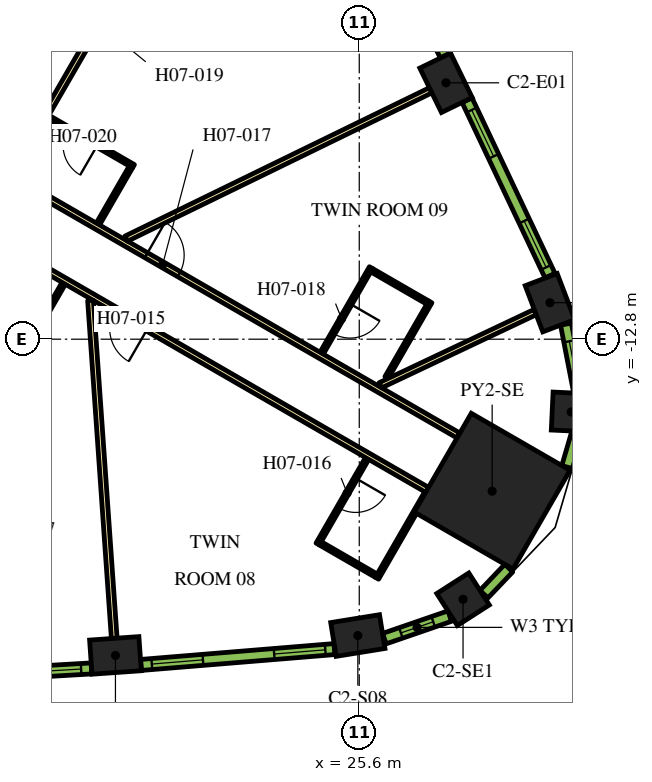
"""IFC4 building model, lengths in metres.
Left out: names, types, materials, properties, quantities, classifications, styles, units other than length and angle.
Written with IfcOpenShell. Run it as: python <this file> out.ifc"""

import sys

from ifc_helpers import new_model, si_unit, direction, frame, frame_2d, origin, origin_2d, place, context, subcontext, project, spatial, rectangle, extrude, element, fill, save


model = new_model("IFC4")
c1 = context("Model", 3, precision=1e-05, world=origin(), true_north=direction((0.0, 1.0)))
c2 = subcontext(c1, "Body", "Model", "MODEL_VIEW")
j1 = project(units=[si_unit("LENGTHUNIT", "METRE"), si_unit("PLANEANGLEUNIT", "RADIAN")], contexts=[c1])
p1 = place(None, origin())
s1 = spatial("IfcSite", under=j1, at=p1, CompositionType="ELEMENT")
p2 = place(p1, origin())
s2 = spatial("IfcBuilding", under=s1, at=p2, CompositionType="ELEMENT")
p3 = place(p2, frame((0.0, 0.0, 103.2)))
s3 = spatial("IfcBuildingStorey", under=s2, at=p3, CompositionType="ELEMENT", Elevation=103.2)
p4 = place(p3, frame((29.097, -16.799, 0.0), z_axis=(0.0, 0.0, 1.0), x_axis=(0.866025403784, -0.5, 0.0)))
e1 = element("IfcColumn", 1, at=p4, inside=s3, PredefinedType="COLUMN", context=c2, shape_type="SweptSolid", body=[
    extrude(rectangle(XDim=3.0, YDim=3.0, at=origin_2d()), origin(), (0.0, 0.0, 1.0), 3.9),
])
for number, where, z_axis, x_axis in (
    (2, (19.184, -21.12, 0.0), (0.0, 0.0, 1.0), (0.998, 0.07, 0.0)),
    (3, (25.563, -20.597, 0.0), (0.0, 0.0, 1.0), (0.987, 0.159, 0.0)),
):
    element("IfcColumn", number, at=place(p3, frame(where, z_axis=z_axis, x_axis=x_axis)), inside=s3, PredefinedType="COLUMN", context=c2, shape_type="SweptSolid", body=[
        extrude(rectangle(XDim=1.3, YDim=0.9, at=origin_2d()), origin(), (0.0, 0.0, 1.0), 3.9),
    ])
for number, where, z_axis, x_axis in (
    (4, (28.331, -19.643, 0.0), (0.0, 0.0, 1.0), (0.842, 0.54, 0.0)),
    (5, (31.177, -14.714, 0.0), (0.0, 0.0, 1.0), (0.047, 0.999, 0.0)),
):
    element("IfcColumn", number, at=place(p3, frame(where, z_axis=z_axis, x_axis=x_axis)), inside=s3, PredefinedType="COLUMN", context=c2, shape_type="SweptSolid", body=[
        extrude(rectangle(XDim=1.0, YDim=1.0, at=origin_2d()), origin(), (0.0, 0.0, 1.0), 3.9),
    ])
for number, where, z_axis, x_axis in (
    (6, (30.619, -11.839, 0.0), (0.0, 0.0, 1.0), (-0.355, 0.935, 0.0)),
    (7, (27.883, -6.054, 0.0), (0.0, 0.0, 1.0), (-0.438, 0.899, 0.0)),
):
    element("IfcColumn", number, at=place(p3, frame(where, z_axis=z_axis, x_axis=x_axis)), inside=s3, PredefinedType="COLUMN", context=c2, shape_type="SweptSolid", body=[
        extrude(rectangle(XDim=1.3, YDim=0.9, at=origin_2d()), origin(), (0.0, 0.0, 1.0), 3.9),
    ])
p5 = place(p3, frame((16.412, -8.523, 0.0), z_axis=(0.0, 0.0, 1.0), x_axis=(0.866025629663, -0.499999608766, 0.0)))
e8 = element("IfcWall", 8, at=p5, inside=s3, PredefinedType="PARTITIONING", context=c2, shape_type="SweptSolid", body=[
    extrude(rectangle(XDim=13.624, YDim=0.15, at=frame_2d((6.812, 0.0))), origin(), (0.0, 0.0, 1.0), 2.75),
])
p6 = place(p5, frame((4.134, 0.0, 0.0)))
e9 = element("IfcOpeningElement", 9, at=p6, cuts=e8, PredefinedType="OPENING", context=c2, shape_type="SweptSolid", body=[
    extrude(rectangle(XDim=1.0, YDim=2.1, at=frame_2d((0.5, 1.05))), frame((0.0, 0.085, 0.0), z_axis=(0.0, -1.0, 0.0), x_axis=(1.0, 0.0, 0.0)), (0.0, 0.0, 1.0), 0.17),
])
p7 = place(p3, frame((19.081, -3.9, 0.0), z_axis=(0.0, 0.0, 1.0), x_axis=(-0.499974327079, -0.866040225545, 0.0)))
e10 = element("IfcWall", 10, at=p7, inside=s3, PredefinedType="PARTITIONING", context=c2, shape_type="SweptSolid", body=[
    extrude(rectangle(XDim=5.258, YDim=0.15, at=frame_2d((2.629, 0.0))), origin(), (0.0, 0.0, 1.0), 2.75),
])
p8 = place(p7, frame((0.18, 0.0, 0.0)))
e11 = element("IfcOpeningElement", 11, at=p8, cuts=e10, PredefinedType="OPENING", context=c2, shape_type="SweptSolid", body=[
    extrude(rectangle(XDim=1.0, YDim=2.1, at=frame_2d((0.5, 1.05))), frame((0.0, 0.085, 0.0), z_axis=(0.0, -1.0, 0.0), x_axis=(1.0, 0.0, 0.0)), (0.0, 0.0, 1.0), 0.17),
])
p9 = place(p3, frame((27.386, -16.764, 0.0), z_axis=(0.0, 0.0, 1.0), x_axis=(-0.866022585856, 0.500004880763, 0.0)))
e12 = element("IfcWall", 12, at=p9, inside=s3, PredefinedType="PARTITIONING", context=c2, shape_type="SweptSolid", body=[
    extrude(rectangle(XDim=13.544, YDim=0.15, at=frame_2d((6.772, 0.0))), origin(), (0.0, 0.0, 1.0), 2.75),
])
p10 = place(p9, frame((8.491, 0.0, 0.0)))
e13 = element("IfcOpeningElement", 13, at=p10, cuts=e12, PredefinedType="OPENING", context=c2, shape_type="SweptSolid", body=[
    extrude(rectangle(XDim=1.0, YDim=2.1, at=frame_2d((0.5, 1.05))), frame((0.0, 0.085, 0.0), z_axis=(0.0, -1.0, 0.0), x_axis=(1.0, 0.0, 0.0)), (0.0, 0.0, 1.0), 0.17),
])
p11 = place(p3, frame((19.153, -20.671, 0.0), z_axis=(0.0, 0.0, 1.0), x_axis=(-0.070070736723, 0.997542025107, 0.0)))
e14 = element("IfcWall", 14, at=p11, inside=s3, PredefinedType="PARTITIONING", context=c2, shape_type="SweptSolid", body=[
    extrude(rectangle(XDim=8.909, YDim=0.15, at=frame_2d((4.455, 0.0))), origin(), (0.0, 0.0, 1.0), 2.75),
])
p12 = place(p3, frame((27.479, -6.251, 0.0), z_axis=(0.0, 0.0, 1.0), x_axis=(-0.898945877276, -0.438059710231, 0.0)))
e15 = element("IfcWall", 15, at=p12, inside=s3, PredefinedType="PARTITIONING", context=c2, shape_type="SweptSolid", body=[
    extrude(rectangle(XDim=8.909, YDim=0.15, at=frame_2d((4.455, 0.0))), origin(), (0.0, 0.0, 1.0), 2.75),
])
p13 = place(p3, frame((30.231, -12.085, 0.0), z_axis=(0.0, 0.0, 1.0), x_axis=(-0.904001132572, -0.427530060122, 0.0)))
e16 = element("IfcWall", 16, at=p13, inside=s3, PredefinedType="PARTITIONING", context=c2, shape_type="SweptSolid", body=[
    extrude(rectangle(XDim=4.51, YDim=0.15, at=frame_2d((2.255, 0.0))), origin(), (0.0, 0.0, 1.0), 2.75),
])
p14 = place(p3, frame((16.978, -12.793, 0.0), z_axis=(0.0, 0.0, 1.0), x_axis=(0.500147619332, 0.865940158947, 0.0)))
e17 = element("IfcWall", 17, at=p14, inside=s3, PredefinedType="PARTITIONING", context=c2, shape_type="SweptSolid", body=[
    extrude(rectangle(XDim=1.69, YDim=0.1, at=frame_2d((0.845, 0.0))), origin(), (0.0, 0.0, 1.0), 2.75),
])
p15 = place(p3, frame((25.807, -15.939, 0.0), z_axis=(0.0, 0.0, 1.0), x_axis=(-0.500006934395, -0.866021400173, 0.0)))
e18 = element("IfcWall", 18, at=p15, inside=s3, PredefinedType="PARTITIONING", context=c2, shape_type="SweptSolid", body=[
    extrude(rectangle(XDim=2.6, YDim=0.1, at=frame_2d((1.3, 0.0))), origin(), (0.0, 0.0, 1.0), 2.75),
])
p16 = place(p15, frame((0.6, 0.0, 0.0)))
e19 = element("IfcOpeningElement", 19, at=p16, cuts=e18, PredefinedType="OPENING", context=c2, shape_type="SweptSolid", body=[
    extrude(rectangle(XDim=0.9, YDim=2.1, at=frame_2d((0.45, 1.05))), frame((0.0, 0.06, 0.0), z_axis=(0.0, -1.0, 0.0), x_axis=(1.0, 0.0, 0.0)), (0.0, 0.0, 1.0), 0.12),
])
p17 = place(p3, frame((24.575, -18.172, 0.0), z_axis=(0.0, 0.0, 1.0), x_axis=(0.865989465428, -0.500062241894, 0.0)))
e20 = element("IfcWall", 20, at=p17, inside=s3, PredefinedType="PARTITIONING", context=c2, shape_type="SweptSolid", body=[
    extrude(rectangle(XDim=1.7, YDim=0.1, at=frame_2d((0.85, 0.0))), origin(), (0.0, 0.0, 1.0), 2.75),
])
p18 = place(p3, frame((27.365, -16.839, 0.0), z_axis=(0.0, 0.0, 1.0), x_axis=(-0.500006934395, -0.866021400173, 0.0)))
e21 = element("IfcWall", 21, at=p18, inside=s3, PredefinedType="PARTITIONING", context=c2, shape_type="SweptSolid", body=[
    extrude(rectangle(XDim=2.6, YDim=0.1, at=frame_2d((1.3, 0.0))), origin(), (0.0, 0.0, 1.0), 2.75),
])
p19 = place(p3, frame((25.91, -10.918, 0.0), z_axis=(0.0, 0.0, 1.0), x_axis=(-0.500006934395, -0.866021400173, 0.0)))
e22 = element("IfcWall", 22, at=p19, inside=s3, PredefinedType="PARTITIONING", context=c2, shape_type="SweptSolid", body=[
    extrude(rectangle(XDim=2.6, YDim=0.1, at=frame_2d((1.3, 0.0))), origin(), (0.0, 0.0, 1.0), 2.75),
])
p20 = place(p19, frame((1.1, 0.0, 0.0)))
e23 = element("IfcOpeningElement", 23, at=p20, cuts=e22, PredefinedType="OPENING", context=c2, shape_type="SweptSolid", body=[
    extrude(rectangle(XDim=0.9, YDim=2.1, at=frame_2d((0.45, 1.05))), frame((0.0, 0.06, 0.0), z_axis=(0.0, -1.0, 0.0), x_axis=(1.0, 0.0, 0.0)), (0.0, 0.0, 1.0), 0.12),
])
p21 = place(p3, frame((25.928, -10.986, 0.0), z_axis=(0.0, 0.0, 1.0), x_axis=(0.866025371046, -0.500000056704, 0.0)))
e24 = element("IfcWall", 24, at=p21, inside=s3, PredefinedType="PARTITIONING", context=c2, shape_type="SweptSolid", body=[
    extrude(rectangle(XDim=1.7, YDim=0.1, at=frame_2d((0.85, 0.0))), origin(), (0.0, 0.0, 1.0), 2.75),
])
p22 = place(p3, frame((26.319, -13.81, 0.0), z_axis=(0.0, 0.0, 1.0), x_axis=(0.499952165731, 0.866053019151, 0.0)))
e25 = element("IfcWall", 25, at=p22, inside=s3, PredefinedType="PARTITIONING", context=c2, shape_type="SweptSolid", body=[
    extrude(rectangle(XDim=2.3, YDim=0.1, at=frame_2d((1.15, 0.0))), origin(), (0.0, 0.0, 1.0), 2.75),
])
p23 = place(p3, frame((19.659, -8.25, 0.0), z_axis=(0.0, 0.0, 1.0), x_axis=(-0.866021400173, 0.500006934395, 0.0)))
e26 = element("IfcWall", 26, at=p23, inside=s3, PredefinedType="PARTITIONING", context=c2, shape_type="SweptSolid", body=[
    extrude(rectangle(XDim=2.6, YDim=0.1, at=frame_2d((1.3, 0.0))), origin(), (0.0, 0.0, 1.0), 2.75),
])
p24 = place(p23, frame((1.1, 0.0, 0.0)))
e27 = element("IfcOpeningElement", 27, at=p24, cuts=e26, PredefinedType="OPENING", context=c2, shape_type="SweptSolid", body=[
    extrude(rectangle(XDim=0.9, YDim=2.1, at=frame_2d((0.45, 1.05))), frame((0.0, 0.06, 0.0), z_axis=(0.0, -1.0, 0.0), x_axis=(1.0, 0.0, 0.0)), (0.0, 0.0, 1.0), 0.12),
])
p25 = place(p3, frame((19.591, -8.268, 0.0), z_axis=(0.0, 0.0, 1.0), x_axis=(-0.500040090343, -0.866002256377, 0.0)))
e28 = element("IfcWall", 28, at=p25, inside=s3, PredefinedType="PARTITIONING", context=c2, shape_type="SweptSolid", body=[
    extrude(rectangle(XDim=1.73, YDim=0.1, at=frame_2d((0.865, 0.0))), origin(), (0.0, 0.0, 1.0), 2.75),
])
p26 = place(p3, frame((13.462, -21.761, 0.0), z_axis=(0.0, 0.0, 1.0), x_axis=(0.998290511436, 0.058447025388, 0.0)))
e29 = element("IfcWall", 29, at=p26, inside=s3, PredefinedType="SOLIDWALL", context=c2, shape_type="SweptSolid", body=[
    extrude(rectangle(XDim=5.1, YDim=0.29, at=frame_2d((2.55, 0.0))), origin(), (0.0, 0.0, 1.0), 3.65),
])
p27 = place(p26, frame((0.272, 0.0, 0.9)))
e30 = element("IfcOpeningElement", 30, at=p27, cuts=e29, PredefinedType="OPENING", context=c2, shape_type="SweptSolid", body=[
    extrude(rectangle(XDim=1.35, YDim=2.15, at=frame_2d((0.675, 1.075))), frame((0.0, 0.155, 0.0), z_axis=(0.0, -1.0, 0.0), x_axis=(1.0, 0.0, 0.0)), (0.0, 0.0, 1.0), 0.31),
])
p28 = place(p26, frame((3.478, 0.0, 0.9)))
e31 = element("IfcOpeningElement", 31, at=p28, cuts=e29, PredefinedType="OPENING", context=c2, shape_type="SweptSolid", body=[
    extrude(rectangle(XDim=1.35, YDim=2.15, at=frame_2d((0.675, 1.075))), frame((0.0, 0.155, 0.0), z_axis=(0.0, -1.0, 0.0), x_axis=(1.0, 0.0, 0.0)), (0.0, 0.0, 1.0), 0.31),
])
p29 = place(p3, frame((19.857, -21.371, 0.0), z_axis=(0.0, 0.0, 1.0), x_axis=(0.99665273362, 0.081751627308, 0.0)))
e32 = element("IfcWall", 32, at=p29, inside=s3, PredefinedType="SOLIDWALL", context=c2, shape_type="SweptSolid", body=[
    extrude(rectangle(XDim=5.107, YDim=0.29, at=frame_2d((2.553, 0.0))), origin(), (0.0, 0.0, 1.0), 3.65),
])
p30 = place(p29, frame((0.285, 0.0, 0.9)))
e33 = element("IfcOpeningElement", 33, at=p30, cuts=e32, PredefinedType="OPENING", context=c2, shape_type="SweptSolid", body=[
    extrude(rectangle(XDim=1.35, YDim=2.15, at=frame_2d((0.675, 1.075))), frame((0.0, 0.155, 0.0), z_axis=(0.0, -1.0, 0.0), x_axis=(1.0, 0.0, 0.0)), (0.0, 0.0, 1.0), 0.31),
])
p31 = place(p29, frame((3.516, 0.0, 0.9)))
e34 = element("IfcOpeningElement", 34, at=p31, cuts=e32, PredefinedType="OPENING", context=c2, shape_type="SweptSolid", body=[
    extrude(rectangle(XDim=1.35, YDim=2.15, at=frame_2d((0.675, 1.075))), frame((0.0, 0.155, 0.0), z_axis=(0.0, -1.0, 0.0), x_axis=(1.0, 0.0, 0.0)), (0.0, 0.0, 1.0), 0.31),
])
p32 = place(p3, frame((26.261, -20.679, 0.0), z_axis=(0.0, 0.0, 1.0), x_axis=(0.945385815453, 0.325953462844, 0.0)))
e35 = element("IfcWall", 35, at=p32, inside=s3, PredefinedType="SOLIDWALL", context=c2, shape_type="SweptSolid", body=[
    extrude(rectangle(XDim=1.819, YDim=0.29, at=frame_2d((0.91, 0.0))), origin(), (0.0, 0.0, 1.0), 3.65),
])
p33 = place(p32, frame((0.46, 0.0, 0.9)))
e36 = element("IfcOpeningElement", 36, at=p33, cuts=e35, PredefinedType="OPENING", context=c2, shape_type="SweptSolid", body=[
    extrude(rectangle(XDim=0.9, YDim=2.15, at=frame_2d((0.45, 1.075))), frame((0.0, 0.155, 0.0), z_axis=(0.0, -1.0, 0.0), x_axis=(1.0, 0.0, 0.0)), (0.0, 0.0, 1.0), 0.31),
])
p34 = place(p3, frame((28.88, -19.509, 0.0), z_axis=(0.0, 0.0, 1.0), x_axis=(0.690414427296, 0.723414071319, 0.0)))
e37 = element("IfcWall", 37, at=p34, inside=s3, PredefinedType="SOLIDWALL", context=c2, shape_type="SweptSolid", body=[
    extrude(rectangle(XDim=0.947, YDim=0.29, at=frame_2d((0.474, 0.0))), origin(), (0.0, 0.0, 1.0), 3.65),
])
p35 = place(p3, frame((31.069, -16.165, 0.0), z_axis=(0.0, 0.0, 1.0), x_axis=(0.281454582132, 0.95957455062, 0.0)))
e38 = element("IfcWall", 38, at=p35, inside=s3, PredefinedType="SOLIDWALL", context=c2, shape_type="SweptSolid", body=[
    extrude(rectangle(XDim=0.947, YDim=0.29, at=frame_2d((0.474, 0.0))), origin(), (0.0, 0.0, 1.0), 3.65),
])
p36 = place(p3, frame((31.385, -14.189, 0.0), z_axis=(0.0, 0.0, 1.0), x_axis=(-0.190409913989, 0.981704672829, 0.0)))
e39 = element("IfcWall", 39, at=p36, inside=s3, PredefinedType="SOLIDWALL", context=c2, shape_type="SweptSolid", body=[
    extrude(rectangle(XDim=1.819, YDim=0.29, at=frame_2d((0.91, 0.0))), origin(), (0.0, 0.0, 1.0), 3.65),
])
p37 = place(p36, frame((0.46, 0.0, 0.9)))
e40 = element("IfcOpeningElement", 40, at=p37, cuts=e39, PredefinedType="OPENING", context=c2, shape_type="SweptSolid", body=[
    extrude(rectangle(XDim=0.9, YDim=2.15, at=frame_2d((0.45, 1.075))), frame((0.0, 0.155, 0.0), z_axis=(0.0, -1.0, 0.0), x_axis=(1.0, 0.0, 0.0)), (0.0, 0.0, 1.0), 0.31),
])
p38 = place(p3, frame((30.62, -11.127, 0.0), z_axis=(0.0, 0.0, 1.0), x_axis=(-0.427543726596, 0.903994669148, 0.0)))
e41 = element("IfcWall", 41, at=p38, inside=s3, PredefinedType="SOLIDWALL", context=c2, shape_type="SweptSolid", body=[
    extrude(rectangle(XDim=5.107, YDim=0.29, at=frame_2d((2.553, 0.0))), origin(), (0.0, 0.0, 1.0), 3.65),
])
p39 = place(p38, frame((0.24, 0.0, 0.9)))
e42 = element("IfcOpeningElement", 42, at=p39, cuts=e41, PredefinedType="OPENING", context=c2, shape_type="SweptSolid", body=[
    extrude(rectangle(XDim=1.35, YDim=2.15, at=frame_2d((0.675, 1.075))), frame((0.0, 0.155, 0.0), z_axis=(0.0, -1.0, 0.0), x_axis=(1.0, 0.0, 0.0)), (0.0, 0.0, 1.0), 0.31),
])
p40 = place(p38, frame((3.471, 0.0, 0.9)))
e43 = element("IfcOpeningElement", 43, at=p40, cuts=e41, PredefinedType="OPENING", context=c2, shape_type="SweptSolid", body=[
    extrude(rectangle(XDim=1.35, YDim=2.15, at=frame_2d((0.675, 1.075))), frame((0.0, 0.155, 0.0), z_axis=(0.0, -1.0, 0.0), x_axis=(1.0, 0.0, 0.0)), (0.0, 0.0, 1.0), 0.31),
])
p41 = place(p3, frame((27.864, -5.336, 0.0), z_axis=(0.0, 0.0, 1.0), x_axis=(-0.448534297211, 0.893765620409, 0.0)))
e44 = element("IfcWall", 44, at=p41, inside=s3, PredefinedType="SOLIDWALL", context=c2, shape_type="SweptSolid", body=[
    extrude(rectangle(XDim=5.1, YDim=0.29, at=frame_2d((2.55, 0.0))), origin(), (0.0, 0.0, 1.0), 3.65),
])
p42 = place(p41, frame((0.272, 0.0, 0.9)))
e45 = element("IfcOpeningElement", 45, at=p42, cuts=e44, PredefinedType="OPENING", context=c2, shape_type="SweptSolid", body=[
    extrude(rectangle(XDim=1.35, YDim=2.15, at=frame_2d((0.675, 1.075))), frame((0.0, 0.155, 0.0), z_axis=(0.0, -1.0, 0.0), x_axis=(1.0, 0.0, 0.0)), (0.0, 0.0, 1.0), 0.31),
])
p43 = place(p41, frame((3.478, 0.0, 0.9)))
e46 = element("IfcOpeningElement", 46, at=p43, cuts=e44, PredefinedType="OPENING", context=c2, shape_type="SweptSolid", body=[
    extrude(rectangle(XDim=1.35, YDim=2.15, at=frame_2d((0.675, 1.075))), frame((0.0, 0.155, 0.0), z_axis=(0.0, -1.0, 0.0), x_axis=(1.0, 0.0, 0.0)), (0.0, 0.0, 1.0), 0.31),
])
p44 = place(p10, origin())
e47 = element("IfcDoor", 47, at=p44, inside=s3, OperationType="SINGLE_SWING_RIGHT", PredefinedType="DOOR", context=c2, shape_type="SweptSolid", body=[
    extrude(rectangle(XDim=1.0, YDim=2.1, at=frame_2d((0.5, 1.05))), frame((0.0, 0.025, 0.0), z_axis=(0.0, -1.0, 0.0), x_axis=(1.0, 0.0, 0.0)), (0.0, 0.0, 1.0), 0.05),
])
fill(e13, e47)
p45 = place(p16, origin())
e48 = element("IfcDoor", 48, at=p45, inside=s3, OperationType="SINGLE_SWING_LEFT", PredefinedType="DOOR", context=c2, shape_type="SweptSolid", body=[
    extrude(rectangle(XDim=0.9, YDim=2.1, at=frame_2d((0.45, 1.05))), frame((0.0, 0.025, 0.0), z_axis=(0.0, -1.0, 0.0), x_axis=(1.0, 0.0, 0.0)), (0.0, 0.0, 1.0), 0.05),
])
fill(e19, e48)
p46 = place(p6, origin())
e49 = element("IfcDoor", 49, at=p46, inside=s3, OperationType="SINGLE_SWING_LEFT", PredefinedType="DOOR", context=c2, shape_type="SweptSolid", body=[
    extrude(rectangle(XDim=1.0, YDim=2.1, at=frame_2d((0.5, 1.05))), frame((0.0, 0.025, 0.0), z_axis=(0.0, -1.0, 0.0), x_axis=(1.0, 0.0, 0.0)), (0.0, 0.0, 1.0), 0.05),
])
fill(e9, e49)
p47 = place(p20, origin())
e50 = element("IfcDoor", 50, at=p47, inside=s3, OperationType="SINGLE_SWING_RIGHT", PredefinedType="DOOR", context=c2, shape_type="SweptSolid", body=[
    extrude(rectangle(XDim=0.9, YDim=2.1, at=frame_2d((0.45, 1.05))), frame((0.0, 0.025, 0.0), z_axis=(0.0, -1.0, 0.0), x_axis=(1.0, 0.0, 0.0)), (0.0, 0.0, 1.0), 0.05),
])
fill(e23, e50)
p48 = place(p24, origin())
e51 = element("IfcDoor", 51, at=p48, inside=s3, OperationType="SINGLE_SWING_LEFT", PredefinedType="DOOR", context=c2, shape_type="SweptSolid", body=[
    extrude(rectangle(XDim=0.9, YDim=2.1, at=frame_2d((0.45, 1.05))), frame((0.0, 0.025, 0.0), z_axis=(0.0, -1.0, 0.0), x_axis=(1.0, 0.0, 0.0)), (0.0, 0.0, 1.0), 0.05),
])
fill(e27, e51)
p49 = place(p28, origin())
e52 = element("IfcWindow", 52, at=p49, inside=s3, PartitioningType="DOUBLE_PANEL_VERTICAL", PredefinedType="WINDOW", context=c2, shape_type="SweptSolid", body=[
    extrude(rectangle(XDim=1.35, YDim=2.15, at=frame_2d((0.675, 1.075))), frame((0.0, 0.015, 0.0), z_axis=(0.0, -1.0, 0.0), x_axis=(1.0, 0.0, 0.0)), (0.0, 0.0, 1.0), 0.06),
])
fill(e31, e52)
p50 = place(p30, origin())
e53 = element("IfcWindow", 53, at=p50, inside=s3, PartitioningType="DOUBLE_PANEL_VERTICAL", PredefinedType="WINDOW", context=c2, shape_type="SweptSolid", body=[
    extrude(rectangle(XDim=1.35, YDim=2.15, at=frame_2d((0.675, 1.075))), frame((0.0, 0.015, 0.0), z_axis=(0.0, -1.0, 0.0), x_axis=(1.0, 0.0, 0.0)), (0.0, 0.0, 1.0), 0.06),
])
fill(e33, e53)
p51 = place(p31, origin())
e54 = element("IfcWindow", 54, at=p51, inside=s3, PartitioningType="DOUBLE_PANEL_VERTICAL", PredefinedType="WINDOW", context=c2, shape_type="SweptSolid", body=[
    extrude(rectangle(XDim=1.35, YDim=2.15, at=frame_2d((0.675, 1.075))), frame((0.0, 0.015, 0.0), z_axis=(0.0, -1.0, 0.0), x_axis=(1.0, 0.0, 0.0)), (0.0, 0.0, 1.0), 0.06),
])
fill(e34, e54)
p52 = place(p33, origin())
e55 = element("IfcWindow", 55, at=p52, inside=s3, PartitioningType="SINGLE_PANEL", PredefinedType="WINDOW", context=c2, shape_type="SweptSolid", body=[
    extrude(rectangle(XDim=0.9, YDim=2.15, at=frame_2d((0.45, 1.075))), frame((0.0, 0.015, 0.0), z_axis=(0.0, -1.0, 0.0), x_axis=(1.0, 0.0, 0.0)), (0.0, 0.0, 1.0), 0.06),
])
fill(e36, e55)
p53 = place(p37, origin())
e56 = element("IfcWindow", 56, at=p53, inside=s3, PartitioningType="SINGLE_PANEL", PredefinedType="WINDOW", context=c2, shape_type="SweptSolid", body=[
    extrude(rectangle(XDim=0.9, YDim=2.15, at=frame_2d((0.45, 1.075))), frame((0.0, 0.015, 0.0), z_axis=(0.0, -1.0, 0.0), x_axis=(1.0, 0.0, 0.0)), (0.0, 0.0, 1.0), 0.06),
])
fill(e40, e56)
p54 = place(p39, origin())
e57 = element("IfcWindow", 57, at=p54, inside=s3, PartitioningType="DOUBLE_PANEL_VERTICAL", PredefinedType="WINDOW", context=c2, shape_type="SweptSolid", body=[
    extrude(rectangle(XDim=1.35, YDim=2.15, at=frame_2d((0.675, 1.075))), frame((0.0, 0.015, 0.0), z_axis=(0.0, -1.0, 0.0), x_axis=(1.0, 0.0, 0.0)), (0.0, 0.0, 1.0), 0.06),
])
fill(e42, e57)
p55 = place(p40, origin())
e58 = element("IfcWindow", 58, at=p55, inside=s3, PartitioningType="DOUBLE_PANEL_VERTICAL", PredefinedType="WINDOW", context=c2, shape_type="SweptSolid", body=[
    extrude(rectangle(XDim=1.35, YDim=2.15, at=frame_2d((0.675, 1.075))), frame((0.0, 0.015, 0.0), z_axis=(0.0, -1.0, 0.0), x_axis=(1.0, 0.0, 0.0)), (0.0, 0.0, 1.0), 0.06),
])
fill(e43, e58)
save(model, sys.argv[1])
